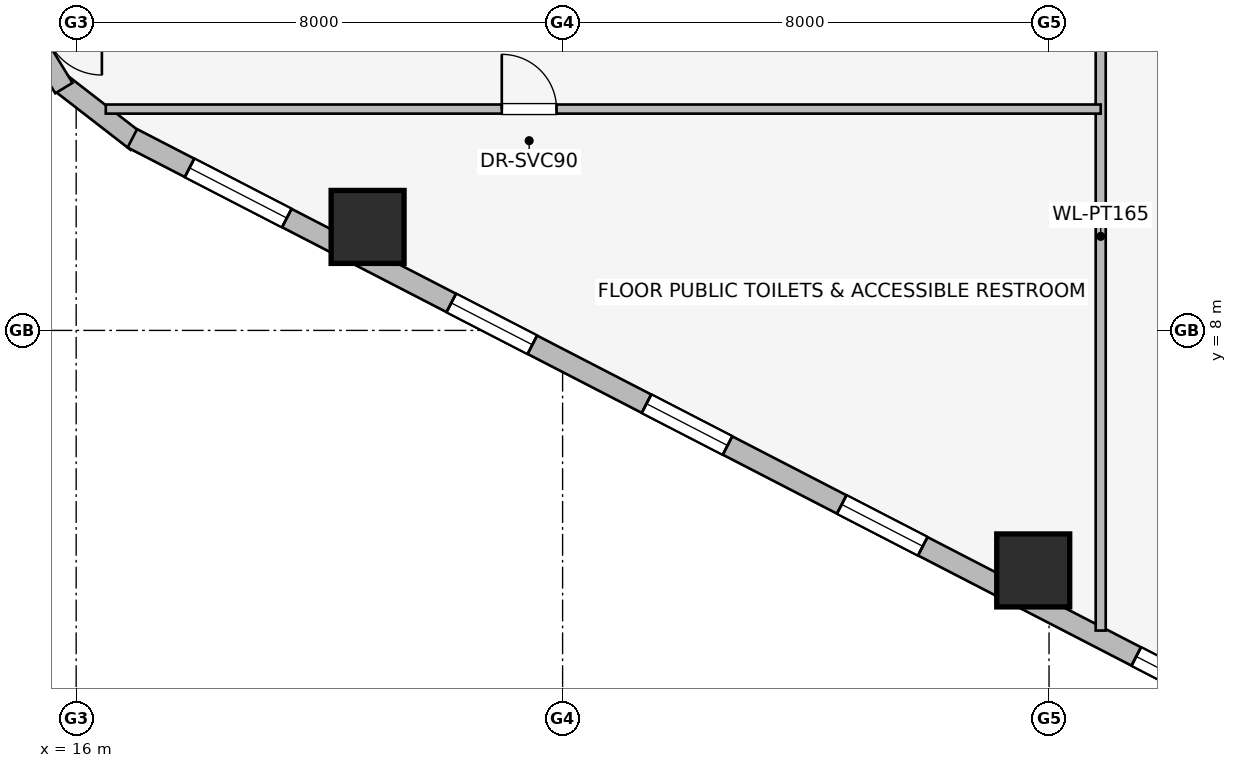
"""IFC4 building model, lengths in metres.
Left out: names, types, materials, properties, quantities, classifications, styles, units other than length and angle.
Written with IfcOpenShell. Run it as: python <this file> out.ifc"""

import sys

from ifc_helpers import new_model, si_unit, direction, frame, frame_2d, origin, origin_2d, place, context, subcontext, project, spatial, rectangle, extrude, element, fill, save


model = new_model("IFC4")
c1 = context("Model", 3, precision=1e-05, world=origin(), true_north=direction((0.0, 1.0)))
c2 = subcontext(c1, "Body", "Model", "MODEL_VIEW")
j1 = project(units=[si_unit("LENGTHUNIT", "METRE"), si_unit("PLANEANGLEUNIT", "RADIAN")], contexts=[c1])
p1 = place(None, origin())
s1 = spatial("IfcSite", under=j1, at=p1, CompositionType="ELEMENT")
p2 = place(p1, origin())
s2 = spatial("IfcBuilding", under=s1, at=p2, CompositionType="ELEMENT")
p3 = place(p2, frame((0.0, 0.0, 34.3)))
s3 = spatial("IfcBuildingStorey", under=s2, at=p3, CompositionType="ELEMENT", Elevation=34.3)
for number, where, z_axis, x_axis in (
    (1, (20.793, 9.702, 0.0), (0.0, 0.0, 1.0), (1.0, 0.0, 0.0)),
    (2, (31.74, 4.053, 0.0), (0.0, 0.0, 1.0), (1.0, 0.0, 0.0)),
):
    element("IfcColumn", number, at=place(p3, frame(where, z_axis=z_axis, x_axis=x_axis)), inside=s3, PredefinedType="COLUMN", context=c2, shape_type="SweptSolid", body=[
        extrude(rectangle(XDim=1.2, YDim=1.2, at=origin_2d()), origin(), (0.0, 0.0, 1.0), 3.65),
    ])
p4 = place(p3, frame((16.998, 11.099, 0.0), z_axis=(0.0, 0.0, 1.0), x_axis=(-0.790691856293, 0.61221433207, 0.0)))
e3 = element("IfcWall", 3, at=p4, inside=s3, PredefinedType="STANDARD", context=c2, shape_type="SweptSolid", body=[
    extrude(rectangle(XDim=1.676, YDim=0.33, at=frame_2d((0.838, 0.0))), origin(), (0.0, 0.0, 1.0), 3.39),
])
p5 = place(p3, frame((15.798, 11.985, 0.0), z_axis=(0.0, 0.0, 1.0), x_axis=(-0.520584129191, 0.853810379671, 0.0)))
e4 = element("IfcWall", 4, at=p5, inside=s3, PredefinedType="STANDARD", context=c2, shape_type="SweptSolid", body=[
    extrude(rectangle(XDim=1.677, YDim=0.33, at=frame_2d((0.838, 0.0))), origin(), (0.0, 0.0, 1.0), 3.39),
])
p6 = place(p3, frame((35.169, 1.743, 0.0), z_axis=(0.0, 0.0, 1.0), x_axis=(-0.888634413993, 0.458616264721, 0.0)))
e5 = element("IfcWall", 5, at=p6, inside=s3, PredefinedType="STANDARD", context=c2, shape_type="SweptSolid", body=[
    extrude(rectangle(XDim=20.531, YDim=0.34, at=frame_2d((10.266, 0.0))), origin(), (0.0, 0.0, 1.0), 2.684),
])
p7 = place(p6, frame((0.902, 0.0, 0.75)))
e6 = element("IfcOpeningElement", 6, at=p7, cuts=e5, PredefinedType="OPENING", context=c2, shape_type="SweptSolid", body=[
    extrude(rectangle(XDim=1.05, YDim=1.4, at=frame_2d((0.525, 0.7))), frame((0.0, 0.18, 0.0), z_axis=(0.0, -1.0, 0.0), x_axis=(1.0, 0.0, 0.0)), (0.0, 0.0, 1.0), 0.36),
])
p8 = place(p6, frame((5.903, 0.0, 0.75)))
e7 = element("IfcOpeningElement", 7, at=p8, cuts=e5, PredefinedType="OPENING", context=c2, shape_type="SweptSolid", body=[
    extrude(rectangle(XDim=1.5, YDim=1.5, at=frame_2d((0.75, 0.75))), frame((0.0, 0.18, 0.0), z_axis=(0.0, -1.0, 0.0), x_axis=(1.0, 0.0, 0.0)), (0.0, 0.0, 1.0), 0.36),
])
p9 = place(p6, frame((9.516, 0.0, 0.75)))
e8 = element("IfcOpeningElement", 8, at=p9, cuts=e5, PredefinedType="OPENING", context=c2, shape_type="SweptSolid", body=[
    extrude(rectangle(XDim=1.5, YDim=1.5, at=frame_2d((0.75, 0.75))), frame((0.0, 0.18, 0.0), z_axis=(0.0, -1.0, 0.0), x_axis=(1.0, 0.0, 0.0)), (0.0, 0.0, 1.0), 0.36),
])
p10 = place(p6, frame((13.129, 0.0, 0.75)))
e9 = element("IfcOpeningElement", 9, at=p10, cuts=e5, PredefinedType="OPENING", context=c2, shape_type="SweptSolid", body=[
    extrude(rectangle(XDim=1.5, YDim=1.5, at=frame_2d((0.75, 0.75))), frame((0.0, 0.18, 0.0), z_axis=(0.0, -1.0, 0.0), x_axis=(1.0, 0.0, 0.0)), (0.0, 0.0, 1.0), 0.36),
])
p11 = place(p6, frame((17.673, 0.0, 0.75)))
e10 = element("IfcOpeningElement", 10, at=p11, cuts=e5, PredefinedType="OPENING", context=c2, shape_type="SweptSolid", body=[
    extrude(rectangle(XDim=1.8, YDim=1.5, at=frame_2d((0.9, 0.75))), frame((0.0, 0.18, 0.0), z_axis=(0.0, -1.0, 0.0), x_axis=(1.0, 0.0, 0.0)), (0.0, 0.0, 1.0), 0.36),
])
p12 = place(p3, frame((32.85, 3.064, 0.0), z_axis=(0.0, 0.0, 1.0), x_axis=(0.0, 1.0, 0.0)))
e11 = element("IfcWall", 11, at=p12, inside=s3, PredefinedType="PARTITIONING", context=c2, shape_type="SweptSolid", body=[
    extrude(rectangle(XDim=12.966, YDim=0.165, at=frame_2d((6.483, 0.0))), origin(), (0.0, 0.0, 1.0), 3.39),
])
p13 = place(p3, frame((16.487, 11.64, 0.0), z_axis=(0.0, 0.0, 1.0), x_axis=(1.0, 0.0, 0.0)))
e12 = element("IfcWall", 12, at=p13, inside=s3, PredefinedType="PARTITIONING", context=c2, shape_type="SweptSolid", body=[
    extrude(rectangle(XDim=16.363, YDim=0.15, at=frame_2d((8.182, 0.0))), origin(), (0.0, 0.0, 1.0), 3.39),
])
p14 = place(p13, frame((6.513, 0.0, 0.0)))
e13 = element("IfcOpeningElement", 13, at=p14, cuts=e12, PredefinedType="OPENING", context=c2, shape_type="SweptSolid", body=[
    extrude(rectangle(XDim=0.9, YDim=2.0, at=frame_2d((0.45, 1.0))), frame((0.0, 0.085, 0.0), z_axis=(0.0, -1.0, 0.0), x_axis=(1.0, 0.0, 0.0)), (0.0, 0.0, 1.0), 0.17),
])
p15 = place(p7, origin())
e14 = element("IfcWindow", 14, at=p15, inside=s3, PartitioningType="SINGLE_PANEL", PredefinedType="WINDOW", context=c2, shape_type="SweptSolid", body=[
    extrude(rectangle(XDim=1.05, YDim=1.4, at=frame_2d((0.525, 0.7))), frame((0.0, 0.03, 0.0), z_axis=(0.0, -1.0, 0.0), x_axis=(1.0, 0.0, 0.0)), (0.0, 0.0, 1.0), 0.06),
])
fill(e6, e14)
p16 = place(p8, origin())
e15 = element("IfcWindow", 15, at=p16, inside=s3, PartitioningType="SINGLE_PANEL", PredefinedType="WINDOW", context=c2, shape_type="SweptSolid", body=[
    extrude(rectangle(XDim=1.5, YDim=1.5, at=frame_2d((0.75, 0.75))), frame((0.0, 0.03, 0.0), z_axis=(0.0, -1.0, 0.0), x_axis=(1.0, 0.0, 0.0)), (0.0, 0.0, 1.0), 0.06),
])
fill(e7, e15)
p17 = place(p9, origin())
e16 = element("IfcWindow", 16, at=p17, inside=s3, PartitioningType="SINGLE_PANEL", PredefinedType="WINDOW", context=c2, shape_type="SweptSolid", body=[
    extrude(rectangle(XDim=1.5, YDim=1.5, at=frame_2d((0.75, 0.75))), frame((0.0, 0.03, 0.0), z_axis=(0.0, -1.0, 0.0), x_axis=(1.0, 0.0, 0.0)), (0.0, 0.0, 1.0), 0.06),
])
fill(e8, e16)
p18 = place(p10, origin())
e17 = element("IfcWindow", 17, at=p18, inside=s3, PartitioningType="SINGLE_PANEL", PredefinedType="WINDOW", context=c2, shape_type="SweptSolid", body=[
    extrude(rectangle(XDim=1.5, YDim=1.5, at=frame_2d((0.75, 0.75))), frame((0.0, 0.03, 0.0), z_axis=(0.0, -1.0, 0.0), x_axis=(1.0, 0.0, 0.0)), (0.0, 0.0, 1.0), 0.06),
])
fill(e9, e17)
p19 = place(p11, origin())
e18 = element("IfcWindow", 18, at=p19, inside=s3, PartitioningType="SINGLE_PANEL", PredefinedType="WINDOW", context=c2, shape_type="SweptSolid", body=[
    extrude(rectangle(XDim=1.8, YDim=1.5, at=frame_2d((0.9, 0.75))), frame((0.0, 0.03, 0.0), z_axis=(0.0, -1.0, 0.0), x_axis=(1.0, 0.0, 0.0)), (0.0, 0.0, 1.0), 0.06),
])
fill(e10, e18)
p20 = place(p14, origin())
e19 = element("IfcDoor", 19, at=p20, inside=s3, OperationType="SINGLE_SWING_LEFT", PredefinedType="DOOR", context=c2, shape_type="SweptSolid", body=[
    extrude(rectangle(XDim=0.9, YDim=2.0, at=frame_2d((0.45, 1.0))), frame((0.0, 0.025, 0.0), z_axis=(0.0, -1.0, 0.0), x_axis=(1.0, 0.0, 0.0)), (0.0, 0.0, 1.0), 0.05),
])
fill(e13, e19)
save(model, sys.argv[1])
